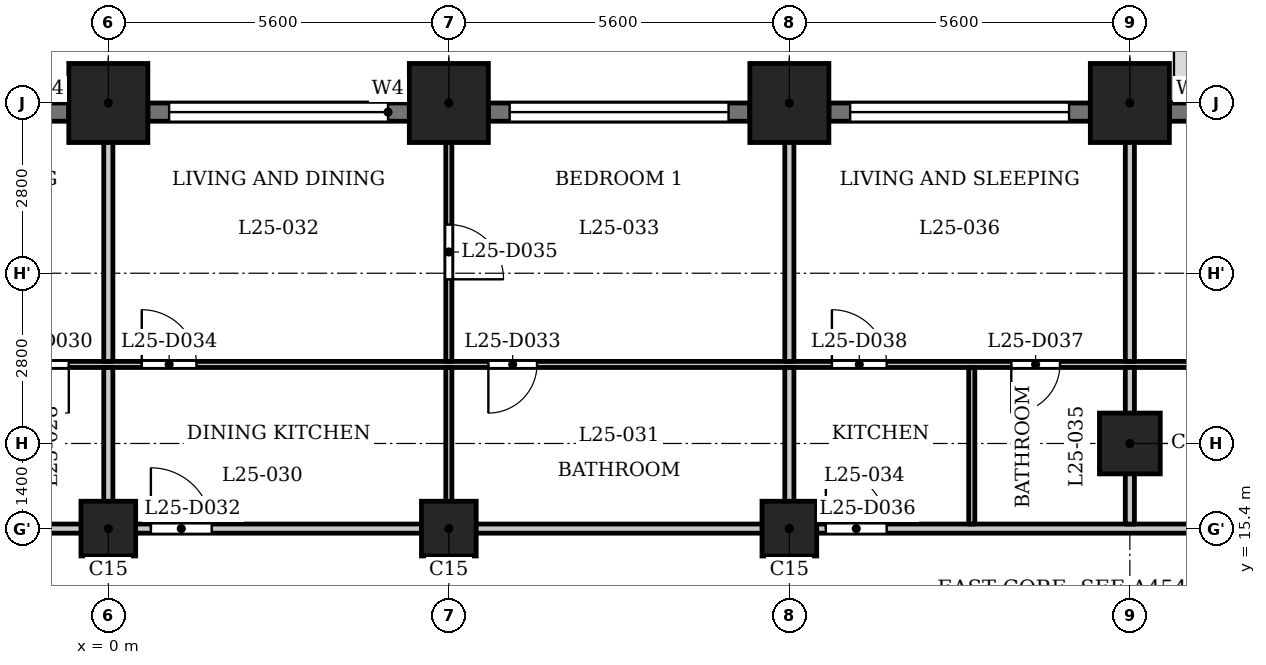
"""IFC4 building model, lengths in metres.
Left out: names, types, materials, properties, quantities, classifications, styles, units other than length and angle.
Written with IfcOpenShell. Run it as: python <this file> out.ifc"""

import sys

from ifc_helpers import new_model, si_unit, direction, frame, frame_2d, origin, origin_2d, place, context, subcontext, project, spatial, rectangle, extrude, element, fill, save


model = new_model("IFC4")
c1 = context("Model", 3, precision=1e-05, world=origin(), true_north=direction((0.0, 1.0)))
c2 = subcontext(c1, "Body", "Model", "MODEL_VIEW")
j1 = project(units=[si_unit("LENGTHUNIT", "METRE"), si_unit("PLANEANGLEUNIT", "RADIAN")], contexts=[c1])
p1 = place(None, origin())
s1 = spatial("IfcSite", under=j1, at=p1, CompositionType="ELEMENT")
p2 = place(p1, origin())
s2 = spatial("IfcBuilding", under=s1, at=p2, CompositionType="ELEMENT")
p3 = place(p2, frame((0.0, 0.0, 100.8)))
s3 = spatial("IfcBuildingStorey", under=s2, at=p3, CompositionType="ELEMENT", Elevation=100.8)
for number, where, z_axis, x_axis in (
    (1, (16.8, 22.4, 0.0), (0.0, 0.0, 1.0), (1.0, 0.0, 0.0)),
    (2, (11.2, 22.4, 0.0), (0.0, 0.0, 1.0), (1.0, 0.0, 0.0)),
    (3, (5.6, 22.4, 0.0), (0.0, 0.0, 1.0), (1.0, 0.0, 0.0)),
    (4, (0.0, 22.4, 0.0), (0.0, 0.0, 1.0), (1.0, 0.0, 0.0)),
):
    element("IfcColumn", number, at=place(p3, frame(where, z_axis=z_axis, x_axis=x_axis)), inside=s3, PredefinedType="COLUMN", context=c2, shape_type="SweptSolid", body=[
        extrude(rectangle(XDim=1.3, YDim=1.3, at=origin_2d()), origin(), (0.0, 0.0, 1.0), 3.5),
    ])
p4 = place(p3, frame((16.8, 16.8, 0.0), z_axis=(0.0, 0.0, 1.0), x_axis=(1.0, 0.0, 0.0)))
e5 = element("IfcColumn", 5, at=p4, inside=s3, PredefinedType="COLUMN", context=c2, shape_type="SweptSolid", body=[
    extrude(rectangle(XDim=1.0, YDim=1.0, at=origin_2d()), origin(), (0.0, 0.0, 1.0), 3.5),
])
for number, where, z_axis, x_axis in (
    (6, (0.0, 15.4, 0.0), (0.0, 0.0, 1.0), (1.0, 0.0, 0.0)),
    (7, (5.6, 15.4, 0.0), (0.0, 0.0, 1.0), (1.0, 0.0, 0.0)),
    (8, (11.2, 15.4, 0.0), (0.0, 0.0, 1.0), (1.0, 0.0, 0.0)),
):
    element("IfcColumn", number, at=place(p3, frame(where, z_axis=z_axis, x_axis=x_axis)), inside=s3, PredefinedType="COLUMN", context=c2, shape_type="SweptSolid", body=[
        extrude(rectangle(XDim=0.9, YDim=0.9, at=origin_2d()), origin(), (0.0, 0.0, 1.0), 3.5),
    ])
p5 = place(p3, frame((20.0, 22.25, 0.0), z_axis=(0.0, 0.0, 1.0), x_axis=(-1.0, 0.0, 0.0)))
e9 = element("IfcWall", 9, at=p5, inside=s3, PredefinedType="SOLIDWALL", context=c2, shape_type="SweptSolid", body=[
    extrude(rectangle(XDim=2.55, YDim=0.3, at=frame_2d((1.275, 0.0))), origin(), (0.0, 0.0, 1.0), 2.4),
])
p6 = place(p5, frame((0.375, 0.0, 0.9)))
e10 = element("IfcOpeningElement", 10, at=p6, cuts=e9, PredefinedType="OPENING", context=c2, shape_type="SweptSolid", body=[
    extrude(rectangle(XDim=1.8, YDim=1.25, at=frame_2d((0.9, 0.625))), frame((0.0, 0.16, 0.0), z_axis=(0.0, -1.0, 0.0), x_axis=(1.0, 0.0, 0.0)), (0.0, 0.0, 1.0), 0.32),
])
p7 = place(p3, frame((16.15, 22.25, 0.0), z_axis=(0.0, 0.0, 1.0), x_axis=(-1.0, 0.0, 0.0)))
e11 = element("IfcWall", 11, at=p7, inside=s3, PredefinedType="SOLIDWALL", context=c2, shape_type="SweptSolid", body=[
    extrude(rectangle(XDim=4.3, YDim=0.3, at=frame_2d((2.15, 0.0))), origin(), (0.0, 0.0, 1.0), 2.4),
])
p8 = place(p7, frame((0.35, 0.0, 1.2)))
e12 = element("IfcOpeningElement", 12, at=p8, cuts=e11, PredefinedType="OPENING", context=c2, shape_type="SweptSolid", body=[
    extrude(rectangle(XDim=3.6, YDim=0.95, at=frame_2d((1.8, 0.475))), frame((0.0, 0.16, 0.0), z_axis=(0.0, -1.0, 0.0), x_axis=(1.0, 0.0, 0.0)), (0.0, 0.0, 1.0), 0.32),
])
p9 = place(p3, frame((10.55, 22.25, 0.0), z_axis=(0.0, 0.0, 1.0), x_axis=(-1.0, 0.0, 0.0)))
e13 = element("IfcWall", 13, at=p9, inside=s3, PredefinedType="SOLIDWALL", context=c2, shape_type="SweptSolid", body=[
    extrude(rectangle(XDim=4.3, YDim=0.3, at=frame_2d((2.15, 0.0))), origin(), (0.0, 0.0, 1.0), 2.4),
])
p10 = place(p9, frame((0.35, 0.0, 1.2)))
e14 = element("IfcOpeningElement", 14, at=p10, cuts=e13, PredefinedType="OPENING", context=c2, shape_type="SweptSolid", body=[
    extrude(rectangle(XDim=3.6, YDim=0.95, at=frame_2d((1.8, 0.475))), frame((0.0, 0.16, 0.0), z_axis=(0.0, -1.0, 0.0), x_axis=(1.0, 0.0, 0.0)), (0.0, 0.0, 1.0), 0.32),
])
p11 = place(p3, frame((4.95, 22.25, 0.0), z_axis=(0.0, 0.0, 1.0), x_axis=(-1.0, 0.0, 0.0)))
e15 = element("IfcWall", 15, at=p11, inside=s3, PredefinedType="SOLIDWALL", context=c2, shape_type="SweptSolid", body=[
    extrude(rectangle(XDim=4.3, YDim=0.3, at=frame_2d((2.15, 0.0))), origin(), (0.0, 0.0, 1.0), 2.4),
])
p12 = place(p11, frame((0.35, 0.0, 1.2)))
e16 = element("IfcOpeningElement", 16, at=p12, cuts=e15, PredefinedType="OPENING", context=c2, shape_type="SweptSolid", body=[
    extrude(rectangle(XDim=3.6, YDim=0.95, at=frame_2d((1.8, 0.475))), frame((0.0, 0.16, 0.0), z_axis=(0.0, -1.0, 0.0), x_axis=(1.0, 0.0, 0.0)), (0.0, 0.0, 1.0), 0.32),
])
p13 = place(p3, frame((-0.65, 22.25, 0.0), z_axis=(0.0, 0.0, 1.0), x_axis=(-1.0, 0.0, 0.0)))
e17 = element("IfcWall", 17, at=p13, inside=s3, PredefinedType="SOLIDWALL", context=c2, shape_type="SweptSolid", body=[
    extrude(rectangle(XDim=4.3, YDim=0.3, at=frame_2d((2.15, 0.0))), origin(), (0.0, 0.0, 1.0), 2.4),
])
p14 = place(p13, frame((0.35, 0.0, 1.2)))
e18 = element("IfcOpeningElement", 18, at=p14, cuts=e17, PredefinedType="OPENING", context=c2, shape_type="SweptSolid", body=[
    extrude(rectangle(XDim=3.6, YDim=0.95, at=frame_2d((1.8, 0.475))), frame((0.0, 0.16, 0.0), z_axis=(0.0, -1.0, 0.0), x_axis=(1.0, 0.0, 0.0)), (0.0, 0.0, 1.0), 0.32),
])
p15 = place(p3, frame((-27.484, 15.4, 0.0), z_axis=(0.0, 0.0, 1.0), x_axis=(1.0, 0.0, 0.0)))
e19 = element("IfcWall", 19, at=p15, inside=s3, PredefinedType="PARTITIONING", context=c2, shape_type="SweptSolid", body=[
    extrude(rectangle(XDim=54.968, YDim=0.15, at=frame_2d((27.484, 0.0))), origin(), (0.0, 0.0, 1.0), 3.2),
])
p16 = place(p15, frame((9.034, 0.0, 0.0)))
e20 = element("IfcOpeningElement", 20, at=p16, cuts=e19, PredefinedType="OPENING", context=c2, shape_type="SweptSolid", body=[
    extrude(rectangle(XDim=1.0, YDim=2.1, at=frame_2d((0.5, 1.05))), frame((0.0, 0.085, 0.0), z_axis=(0.0, -1.0, 0.0), x_axis=(1.0, 0.0, 0.0)), (0.0, 0.0, 1.0), 0.17),
])
p17 = place(p15, frame((14.634, 0.0, 0.0)))
e21 = element("IfcOpeningElement", 21, at=p17, cuts=e19, PredefinedType="OPENING", context=c2, shape_type="SweptSolid", body=[
    extrude(rectangle(XDim=1.0, YDim=2.1, at=frame_2d((0.5, 1.05))), frame((0.0, 0.085, 0.0), z_axis=(0.0, -1.0, 0.0), x_axis=(1.0, 0.0, 0.0)), (0.0, 0.0, 1.0), 0.17),
])
p18 = place(p15, frame((19.984, 0.0, 0.0)))
e22 = element("IfcOpeningElement", 22, at=p18, cuts=e19, PredefinedType="OPENING", context=c2, shape_type="SweptSolid", body=[
    extrude(rectangle(XDim=1.0, YDim=2.1, at=frame_2d((0.5, 1.05))), frame((0.0, 0.085, 0.0), z_axis=(0.0, -1.0, 0.0), x_axis=(1.0, 0.0, 0.0)), (0.0, 0.0, 1.0), 0.17),
])
p19 = place(p15, frame((23.234, 0.0, 0.0)))
e23 = element("IfcOpeningElement", 23, at=p19, cuts=e19, PredefinedType="OPENING", context=c2, shape_type="SweptSolid", body=[
    extrude(rectangle(XDim=1.0, YDim=2.1, at=frame_2d((0.5, 1.05))), frame((0.0, 0.085, 0.0), z_axis=(0.0, -1.0, 0.0), x_axis=(1.0, 0.0, 0.0)), (0.0, 0.0, 1.0), 0.17),
])
p20 = place(p15, frame((28.184, 0.0, 0.0)))
e24 = element("IfcOpeningElement", 24, at=p20, cuts=e19, PredefinedType="OPENING", context=c2, shape_type="SweptSolid", body=[
    extrude(rectangle(XDim=1.0, YDim=2.1, at=frame_2d((0.5, 1.05))), frame((0.0, 0.085, 0.0), z_axis=(0.0, -1.0, 0.0), x_axis=(1.0, 0.0, 0.0)), (0.0, 0.0, 1.0), 0.17),
])
p21 = place(p15, frame((39.284, 0.0, 0.0)))
e25 = element("IfcOpeningElement", 25, at=p21, cuts=e19, PredefinedType="OPENING", context=c2, shape_type="SweptSolid", body=[
    extrude(rectangle(XDim=1.0, YDim=2.1, at=frame_2d((0.5, 1.05))), frame((0.0, 0.085, 0.0), z_axis=(0.0, -1.0, 0.0), x_axis=(1.0, 0.0, 0.0)), (0.0, 0.0, 1.0), 0.17),
])
p22 = place(p15, frame((48.234, 0.0, 0.0)))
e26 = element("IfcOpeningElement", 26, at=p22, cuts=e19, PredefinedType="OPENING", context=c2, shape_type="SweptSolid", body=[
    extrude(rectangle(XDim=1.0, YDim=2.1, at=frame_2d((0.5, 1.05))), frame((0.0, 0.085, 0.0), z_axis=(0.0, -1.0, 0.0), x_axis=(1.0, 0.0, 0.0)), (0.0, 0.0, 1.0), 0.17),
])
p23 = place(p3, frame((-26.44, 18.1, 0.0), z_axis=(0.0, 0.0, 1.0), x_axis=(1.0, 0.0, 0.0)))
e27 = element("IfcWall", 27, at=p23, inside=s3, PredefinedType="PARTITIONING", context=c2, shape_type="SweptSolid", body=[
    extrude(rectangle(XDim=52.63, YDim=0.1, at=frame_2d((26.315, 0.0))), origin(), (0.0, 0.0, 1.0), 3.2),
])
p24 = place(p23, frame((2.626, 0.0, 0.0)))
e28 = element("IfcOpeningElement", 28, at=p24, cuts=e27, PredefinedType="OPENING", context=c2, shape_type="SweptSolid", body=[
    extrude(rectangle(XDim=0.8, YDim=2.1, at=frame_2d((0.4, 1.05))), frame((0.0, 0.06, 0.0), z_axis=(0.0, -1.0, 0.0), x_axis=(1.0, 0.0, 0.0)), (0.0, 0.0, 1.0), 0.12),
])
p25 = place(p23, frame((8.09, 0.0, 0.0)))
e29 = element("IfcOpeningElement", 29, at=p25, cuts=e27, PredefinedType="OPENING", context=c2, shape_type="SweptSolid", body=[
    extrude(rectangle(XDim=0.9, YDim=2.1, at=frame_2d((0.45, 1.05))), frame((0.0, 0.06, 0.0), z_axis=(0.0, -1.0, 0.0), x_axis=(1.0, 0.0, 0.0)), (0.0, 0.0, 1.0), 0.12),
])
p26 = place(p23, frame((10.29, 0.0, 0.0)))
e30 = element("IfcOpeningElement", 30, at=p26, cuts=e27, PredefinedType="OPENING", context=c2, shape_type="SweptSolid", body=[
    extrude(rectangle(XDim=0.8, YDim=2.1, at=frame_2d((0.4, 1.05))), frame((0.0, 0.06, 0.0), z_axis=(0.0, -1.0, 0.0), x_axis=(1.0, 0.0, 0.0)), (0.0, 0.0, 1.0), 0.12),
])
p27 = place(p23, frame((13.69, 0.0, 0.0)))
e31 = element("IfcOpeningElement", 31, at=p27, cuts=e27, PredefinedType="OPENING", context=c2, shape_type="SweptSolid", body=[
    extrude(rectangle(XDim=0.9, YDim=2.1, at=frame_2d((0.45, 1.05))), frame((0.0, 0.06, 0.0), z_axis=(0.0, -1.0, 0.0), x_axis=(1.0, 0.0, 0.0)), (0.0, 0.0, 1.0), 0.12),
])
p28 = place(p23, frame((15.89, 0.0, 0.0)))
e32 = element("IfcOpeningElement", 32, at=p28, cuts=e27, PredefinedType="OPENING", context=c2, shape_type="SweptSolid", body=[
    extrude(rectangle(XDim=0.8, YDim=2.1, at=frame_2d((0.4, 1.05))), frame((0.0, 0.06, 0.0), z_axis=(0.0, -1.0, 0.0), x_axis=(1.0, 0.0, 0.0)), (0.0, 0.0, 1.0), 0.12),
])
p29 = place(p23, frame((19.04, 0.0, 0.0)))
e33 = element("IfcOpeningElement", 33, at=p29, cuts=e27, PredefinedType="OPENING", context=c2, shape_type="SweptSolid", body=[
    extrude(rectangle(XDim=0.9, YDim=2.1, at=frame_2d((0.45, 1.05))), frame((0.0, 0.06, 0.0), z_axis=(0.0, -1.0, 0.0), x_axis=(1.0, 0.0, 0.0)), (0.0, 0.0, 1.0), 0.12),
])
p30 = place(p23, frame((24.99, 0.0, 0.0)))
e34 = element("IfcOpeningElement", 34, at=p30, cuts=e27, PredefinedType="OPENING", context=c2, shape_type="SweptSolid", body=[
    extrude(rectangle(XDim=0.8, YDim=2.1, at=frame_2d((0.4, 1.05))), frame((0.0, 0.06, 0.0), z_axis=(0.0, -1.0, 0.0), x_axis=(1.0, 0.0, 0.0)), (0.0, 0.0, 1.0), 0.12),
])
p31 = place(p23, frame((22.29, 0.0, 0.0)))
e35 = element("IfcOpeningElement", 35, at=p31, cuts=e27, PredefinedType="OPENING", context=c2, shape_type="SweptSolid", body=[
    extrude(rectangle(XDim=0.9, YDim=2.1, at=frame_2d((0.45, 1.05))), frame((0.0, 0.06, 0.0), z_axis=(0.0, -1.0, 0.0), x_axis=(1.0, 0.0, 0.0)), (0.0, 0.0, 1.0), 0.12),
])
p32 = place(p23, frame((32.69, 0.0, 0.0)))
e36 = element("IfcOpeningElement", 36, at=p32, cuts=e27, PredefinedType="OPENING", context=c2, shape_type="SweptSolid", body=[
    extrude(rectangle(XDim=0.8, YDim=2.1, at=frame_2d((0.4, 1.05))), frame((0.0, 0.06, 0.0), z_axis=(0.0, -1.0, 0.0), x_axis=(1.0, 0.0, 0.0)), (0.0, 0.0, 1.0), 0.12),
])
p33 = place(p23, frame((26.99, 0.0, 0.0)))
e37 = element("IfcOpeningElement", 37, at=p33, cuts=e27, PredefinedType="OPENING", context=c2, shape_type="SweptSolid", body=[
    extrude(rectangle(XDim=0.9, YDim=2.1, at=frame_2d((0.45, 1.05))), frame((0.0, 0.06, 0.0), z_axis=(0.0, -1.0, 0.0), x_axis=(1.0, 0.0, 0.0)), (0.0, 0.0, 1.0), 0.12),
])
p34 = place(p23, frame((41.29, 0.0, 0.0)))
e38 = element("IfcOpeningElement", 38, at=p34, cuts=e27, PredefinedType="OPENING", context=c2, shape_type="SweptSolid", body=[
    extrude(rectangle(XDim=0.8, YDim=2.1, at=frame_2d((0.4, 1.05))), frame((0.0, 0.06, 0.0), z_axis=(0.0, -1.0, 0.0), x_axis=(1.0, 0.0, 0.0)), (0.0, 0.0, 1.0), 0.12),
])
p35 = place(p23, frame((38.34, 0.0, 0.0)))
e39 = element("IfcOpeningElement", 39, at=p35, cuts=e27, PredefinedType="OPENING", context=c2, shape_type="SweptSolid", body=[
    extrude(rectangle(XDim=0.9, YDim=2.1, at=frame_2d((0.45, 1.05))), frame((0.0, 0.06, 0.0), z_axis=(0.0, -1.0, 0.0), x_axis=(1.0, 0.0, 0.0)), (0.0, 0.0, 1.0), 0.12),
])
p36 = place(p23, frame((50.74, 0.0, 0.0)))
e40 = element("IfcOpeningElement", 40, at=p36, cuts=e27, PredefinedType="OPENING", context=c2, shape_type="SweptSolid", body=[
    extrude(rectangle(XDim=0.8, YDim=2.1, at=frame_2d((0.4, 1.05))), frame((0.0, 0.06, 0.0), z_axis=(0.0, -1.0, 0.0), x_axis=(1.0, 0.0, 0.0)), (0.0, 0.0, 1.0), 0.12),
])
p37 = place(p23, frame((47.29, 0.0, 0.0)))
e41 = element("IfcOpeningElement", 41, at=p37, cuts=e27, PredefinedType="OPENING", context=c2, shape_type="SweptSolid", body=[
    extrude(rectangle(XDim=0.9, YDim=2.1, at=frame_2d((0.45, 1.05))), frame((0.0, 0.06, 0.0), z_axis=(0.0, -1.0, 0.0), x_axis=(1.0, 0.0, 0.0)), (0.0, 0.0, 1.0), 0.12),
])
p38 = place(p3, frame((0.0, 15.475, 0.0), z_axis=(0.0, 0.0, 1.0), x_axis=(0.0, 1.0, 0.0)))
e42 = element("IfcWall", 42, at=p38, inside=s3, PredefinedType="PARTITIONING", context=c2, shape_type="SweptSolid", body=[
    extrude(rectangle(XDim=2.575, YDim=0.15, at=frame_2d((1.288, 0.0))), origin(), (0.0, 0.0, 1.0), 3.2),
])
p39 = place(p3, frame((0.0, 18.15, 0.0), z_axis=(0.0, 0.0, 1.0), x_axis=(0.0, 1.0, 0.0)))
e43 = element("IfcWall", 43, at=p39, inside=s3, PredefinedType="PARTITIONING", context=c2, shape_type="SweptSolid", body=[
    extrude(rectangle(XDim=4.88, YDim=0.15, at=frame_2d((2.44, 0.0))), origin(), (0.0, 0.0, 1.0), 3.2),
])
p40 = place(p3, frame((5.6, 15.475, 0.0), z_axis=(0.0, 0.0, 1.0), x_axis=(0.0, 1.0, 0.0)))
e44 = element("IfcWall", 44, at=p40, inside=s3, PredefinedType="PARTITIONING", context=c2, shape_type="SweptSolid", body=[
    extrude(rectangle(XDim=2.575, YDim=0.1, at=frame_2d((1.288, 0.0))), origin(), (0.0, 0.0, 1.0), 3.2),
])
p41 = place(p3, frame((5.6, 18.15, 0.0), z_axis=(0.0, 0.0, 1.0), x_axis=(0.0, 1.0, 0.0)))
e45 = element("IfcWall", 45, at=p41, inside=s3, PredefinedType="PARTITIONING", context=c2, shape_type="SweptSolid", body=[
    extrude(rectangle(XDim=4.88, YDim=0.1, at=frame_2d((2.44, 0.0))), origin(), (0.0, 0.0, 1.0), 3.2),
])
p42 = place(p41, frame((1.35, 0.0, 0.0)))
e46 = element("IfcOpeningElement", 46, at=p42, cuts=e45, PredefinedType="OPENING", context=c2, shape_type="SweptSolid", body=[
    extrude(rectangle(XDim=0.9, YDim=2.1, at=frame_2d((0.45, 1.05))), frame((0.0, 0.06, 0.0), z_axis=(0.0, -1.0, 0.0), x_axis=(1.0, 0.0, 0.0)), (0.0, 0.0, 1.0), 0.12),
])
p43 = place(p3, frame((11.2, 15.475, 0.0), z_axis=(0.0, 0.0, 1.0), x_axis=(0.0, 1.0, 0.0)))
e47 = element("IfcWall", 47, at=p43, inside=s3, PredefinedType="PARTITIONING", context=c2, shape_type="SweptSolid", body=[
    extrude(rectangle(XDim=2.575, YDim=0.15, at=frame_2d((1.288, 0.0))), origin(), (0.0, 0.0, 1.0), 3.2),
])
p44 = place(p3, frame((11.2, 18.15, 0.0), z_axis=(0.0, 0.0, 1.0), x_axis=(0.0, 1.0, 0.0)))
e48 = element("IfcWall", 48, at=p44, inside=s3, PredefinedType="PARTITIONING", context=c2, shape_type="SweptSolid", body=[
    extrude(rectangle(XDim=4.88, YDim=0.15, at=frame_2d((2.44, 0.0))), origin(), (0.0, 0.0, 1.0), 3.2),
])
p45 = place(p3, frame((14.2, 15.475, 0.0), z_axis=(0.0, 0.0, 1.0), x_axis=(0.0, 1.0, 0.0)))
e49 = element("IfcWall", 49, at=p45, inside=s3, PredefinedType="PARTITIONING", context=c2, shape_type="SweptSolid", body=[
    extrude(rectangle(XDim=2.575, YDim=0.1, at=frame_2d((1.288, 0.0))), origin(), (0.0, 0.0, 1.0), 3.2),
])
p46 = place(p3, frame((16.8, 15.475, 0.0), z_axis=(0.0, 0.0, 1.0), x_axis=(0.0, 1.0, 0.0)))
e50 = element("IfcWall", 50, at=p46, inside=s3, PredefinedType="PARTITIONING", context=c2, shape_type="SweptSolid", body=[
    extrude(rectangle(XDim=2.575, YDim=0.15, at=frame_2d((1.288, 0.0))), origin(), (0.0, 0.0, 1.0), 3.2),
])
p47 = place(p3, frame((16.8, 18.15, 0.0), z_axis=(0.0, 0.0, 1.0), x_axis=(0.0, 1.0, 0.0)))
e51 = element("IfcWall", 51, at=p47, inside=s3, PredefinedType="PARTITIONING", context=c2, shape_type="SweptSolid", body=[
    extrude(rectangle(XDim=4.88, YDim=0.15, at=frame_2d((2.44, 0.0))), origin(), (0.0, 0.0, 1.0), 3.2),
])
p48 = place(p30, origin())
e52 = element("IfcDoor", 52, at=p48, inside=s3, OperationType="SINGLE_SWING_RIGHT", PredefinedType="DOOR", context=c2, shape_type="SweptSolid", body=[
    extrude(rectangle(XDim=0.8, YDim=2.1, at=frame_2d((0.4, 1.05))), frame((0.0, 0.025, 0.0), z_axis=(0.0, -1.0, 0.0), x_axis=(1.0, 0.0, 0.0)), (0.0, 0.0, 1.0), 0.05),
])
fill(e34, e52)
p49 = place(p20, origin())
e53 = element("IfcDoor", 53, at=p49, inside=s3, OperationType="SINGLE_SWING_RIGHT", PredefinedType="DOOR", context=c2, shape_type="SweptSolid", body=[
    extrude(rectangle(XDim=1.0, YDim=2.1, at=frame_2d((0.5, 1.05))), frame((0.0, 0.025, 0.0), z_axis=(0.0, -1.0, 0.0), x_axis=(1.0, 0.0, 0.0)), (0.0, 0.0, 1.0), 0.05),
])
fill(e24, e53)
p50 = place(p32, origin())
e54 = element("IfcDoor", 54, at=p50, inside=s3, OperationType="SINGLE_SWING_LEFT", PredefinedType="DOOR", context=c2, shape_type="SweptSolid", body=[
    extrude(rectangle(XDim=0.8, YDim=2.1, at=frame_2d((0.4, 1.05))), frame((0.0, 0.025, 0.0), z_axis=(0.0, -1.0, 0.0), x_axis=(1.0, 0.0, 0.0)), (0.0, 0.0, 1.0), 0.05),
])
fill(e36, e54)
p51 = place(p33, origin())
e55 = element("IfcDoor", 55, at=p51, inside=s3, OperationType="SINGLE_SWING_RIGHT", PredefinedType="DOOR", context=c2, shape_type="SweptSolid", body=[
    extrude(rectangle(XDim=0.9, YDim=2.1, at=frame_2d((0.45, 1.05))), frame((0.0, 0.025, 0.0), z_axis=(0.0, -1.0, 0.0), x_axis=(1.0, 0.0, 0.0)), (0.0, 0.0, 1.0), 0.05),
])
fill(e37, e55)
p52 = place(p42, origin())
e56 = element("IfcDoor", 56, at=p52, inside=s3, OperationType="SINGLE_SWING_LEFT", PredefinedType="DOOR", context=c2, shape_type="SweptSolid", body=[
    extrude(rectangle(XDim=0.9, YDim=2.1, at=frame_2d((0.45, 1.05))), frame((0.0, 0.025, 0.0), z_axis=(0.0, -1.0, 0.0), x_axis=(1.0, 0.0, 0.0)), (0.0, 0.0, 1.0), 0.05),
])
fill(e46, e56)
p53 = place(p21, origin())
e57 = element("IfcDoor", 57, at=p53, inside=s3, OperationType="SINGLE_SWING_RIGHT", PredefinedType="DOOR", context=c2, shape_type="SweptSolid", body=[
    extrude(rectangle(XDim=1.0, YDim=2.1, at=frame_2d((0.5, 1.05))), frame((0.0, 0.025, 0.0), z_axis=(0.0, -1.0, 0.0), x_axis=(1.0, 0.0, 0.0)), (0.0, 0.0, 1.0), 0.05),
])
fill(e25, e57)
p54 = place(p34, origin())
e58 = element("IfcDoor", 58, at=p54, inside=s3, OperationType="SINGLE_SWING_LEFT", PredefinedType="DOOR", context=c2, shape_type="SweptSolid", body=[
    extrude(rectangle(XDim=0.8, YDim=2.1, at=frame_2d((0.4, 1.05))), frame((0.0, 0.025, 0.0), z_axis=(0.0, -1.0, 0.0), x_axis=(1.0, 0.0, 0.0)), (0.0, 0.0, 1.0), 0.05),
])
fill(e38, e58)
p55 = place(p35, origin())
e59 = element("IfcDoor", 59, at=p55, inside=s3, OperationType="SINGLE_SWING_RIGHT", PredefinedType="DOOR", context=c2, shape_type="SweptSolid", body=[
    extrude(rectangle(XDim=0.9, YDim=2.1, at=frame_2d((0.45, 1.05))), frame((0.0, 0.025, 0.0), z_axis=(0.0, -1.0, 0.0), x_axis=(1.0, 0.0, 0.0)), (0.0, 0.0, 1.0), 0.05),
])
fill(e39, e59)
p56 = place(p8, origin())
e60 = element("IfcWindow", 60, at=p56, inside=s3, PartitioningType="SINGLE_PANEL", PredefinedType="WINDOW", context=c2, shape_type="SweptSolid", body=[
    extrude(rectangle(XDim=3.6, YDim=0.95, at=frame_2d((1.8, 0.475))), frame((0.0, 0.03, 0.0), z_axis=(0.0, -1.0, 0.0), x_axis=(1.0, 0.0, 0.0)), (0.0, 0.0, 1.0), 0.06),
])
fill(e12, e60)
p57 = place(p10, origin())
e61 = element("IfcWindow", 61, at=p57, inside=s3, PartitioningType="SINGLE_PANEL", PredefinedType="WINDOW", context=c2, shape_type="SweptSolid", body=[
    extrude(rectangle(XDim=3.6, YDim=0.95, at=frame_2d((1.8, 0.475))), frame((0.0, 0.03, 0.0), z_axis=(0.0, -1.0, 0.0), x_axis=(1.0, 0.0, 0.0)), (0.0, 0.0, 1.0), 0.06),
])
fill(e14, e61)
p58 = place(p12, origin())
e62 = element("IfcWindow", 62, at=p58, inside=s3, PartitioningType="SINGLE_PANEL", PredefinedType="WINDOW", context=c2, shape_type="SweptSolid", body=[
    extrude(rectangle(XDim=3.6, YDim=0.95, at=frame_2d((1.8, 0.475))), frame((0.0, 0.03, 0.0), z_axis=(0.0, -1.0, 0.0), x_axis=(1.0, 0.0, 0.0)), (0.0, 0.0, 1.0), 0.06),
])
fill(e16, e62)
save(model, sys.argv[1])
